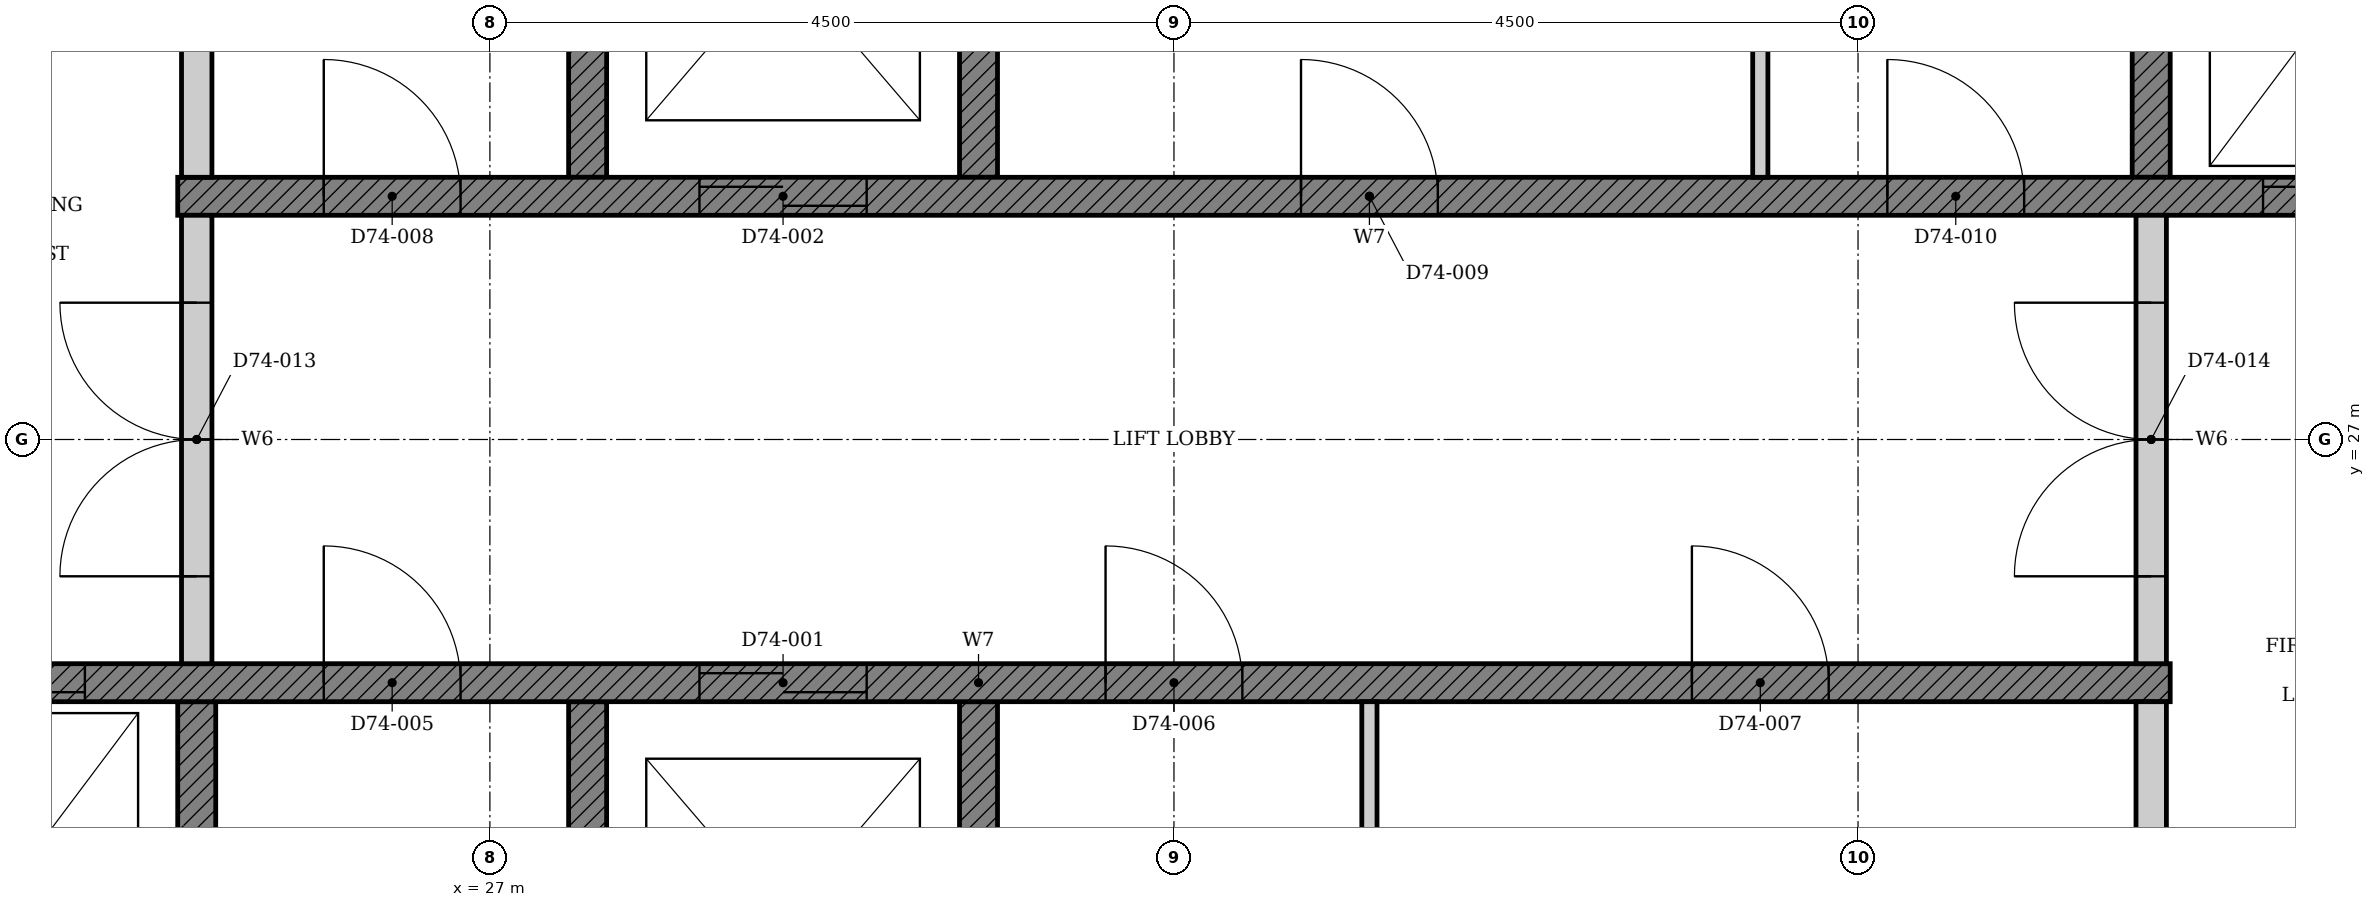
"""IFC4 building model, lengths in metres.
Left out: names, types, materials, properties, quantities, classifications, styles, units other than length and angle.
Written with IfcOpenShell. Run it as: python <this file> out.ifc"""

import sys

from ifc_helpers import new_model, si_unit, direction, frame, frame_2d, origin, place, context, subcontext, project, spatial, polyline, rectangle, outline, extrude, element, fill, save


model = new_model("IFC4")
c1 = context("Model", 3, precision=1e-05, world=origin(), true_north=direction((0.0, 1.0)))
c2 = subcontext(c1, "Body", "Model", "MODEL_VIEW")
j1 = project(units=[si_unit("LENGTHUNIT", "METRE"), si_unit("PLANEANGLEUNIT", "RADIAN")], contexts=[c1])
p1 = place(None, origin())
s1 = spatial("IfcSite", under=j1, at=p1, CompositionType="ELEMENT")
p2 = place(p1, origin())
s2 = spatial("IfcBuilding", under=s1, at=p2, CompositionType="ELEMENT")
p3 = place(p2, frame((0.0, 0.0, 290.8)))
s3 = spatial("IfcBuildingStorey", under=s2, at=p3, CompositionType="ELEMENT", Elevation=290.8)
p4 = place(p3, origin())
e1 = element("IfcWall", 1, at=p4, inside=s3, PredefinedType="SHEAR", context=c2, shape_type="SweptSolid", body=[
    extrude(outline(polyline([(22.375, 22.35), (25.197, 22.35), (25.197, 25.275), (24.947, 25.275), (24.947, 22.65), (22.625, 22.65), (22.625, 25.275), (22.375, 25.275), (22.375, 22.35)])), origin(), (0.0, 0.0, 1.0), 3.4),
])
p5 = place(p3, origin())
e2 = element("IfcWall", 2, at=p5, inside=s3, PredefinedType="SHEAR", context=c2, shape_type="SweptSolid", body=[
    extrude(outline(polyline([(27.518, 22.35), (30.339, 22.35), (30.339, 25.275), (30.089, 25.275), (30.089, 22.65), (27.768, 22.65), (27.768, 25.275), (27.518, 25.275), (27.518, 22.35)])), origin(), (0.0, 0.0, 1.0), 3.4),
])
p6 = place(p3, origin())
e3 = element("IfcWall", 3, at=p6, inside=s3, PredefinedType="SHEAR", context=c2, shape_type="SweptSolid", body=[
    extrude(outline(polyline([(27.518, 28.725), (27.768, 28.725), (27.768, 31.35), (30.089, 31.35), (30.089, 28.725), (30.339, 28.725), (30.339, 31.65), (27.518, 31.65), (27.518, 28.725)])), origin(), (0.0, 0.0, 1.0), 3.4),
])
p7 = place(p3, origin())
e4 = element("IfcWall", 4, at=p7, inside=s3, PredefinedType="SHEAR", context=c2, shape_type="SweptSolid", body=[
    extrude(outline(polyline([(37.803, 28.725), (38.053, 28.725), (38.053, 31.35), (40.375, 31.35), (40.375, 28.725), (40.625, 28.725), (40.625, 31.65), (37.803, 31.65), (37.803, 28.725)])), origin(), (0.0, 0.0, 1.0), 3.4),
])
p8 = place(p3, frame((22.375, 25.4, 0.0), z_axis=(0.0, 0.0, 1.0), x_axis=(1.0, 0.0, 0.0)))
e5 = element("IfcWall", 5, at=p8, inside=s3, PredefinedType="SHEAR", context=c2, shape_type="SweptSolid", body=[
    extrude(rectangle(XDim=15.678, YDim=0.25, at=frame_2d((7.839, 0.0))), origin(), (0.0, 0.0, 1.0), 3.4),
])
p9 = place(p8, frame((6.004, 0.0, 0.0)))
e6 = element("IfcOpeningElement", 6, at=p9, cuts=e5, PredefinedType="OPENING", context=c2, shape_type="SweptSolid", body=[
    extrude(rectangle(XDim=1.1, YDim=2.1, at=frame_2d((0.55, 1.05))), frame((0.0, 0.135, 0.0), z_axis=(0.0, -1.0, 0.0), x_axis=(1.0, 0.0, 0.0)), (0.0, 0.0, 1.0), 0.27),
])
p10 = place(p8, frame((0.861, 0.0, 0.0)))
e7 = element("IfcOpeningElement", 7, at=p10, cuts=e5, PredefinedType="OPENING", context=c2, shape_type="SweptSolid", body=[
    extrude(rectangle(XDim=1.1, YDim=2.1, at=frame_2d((0.55, 1.05))), frame((0.0, 0.135, 0.0), z_axis=(0.0, -1.0, 0.0), x_axis=(1.0, 0.0, 0.0)), (0.0, 0.0, 1.0), 0.27),
])
p11 = place(p8, frame((3.532, 0.0, 0.0)))
e8 = element("IfcOpeningElement", 8, at=p11, cuts=e5, PredefinedType="OPENING", context=c2, shape_type="SweptSolid", body=[
    extrude(rectangle(XDim=0.9, YDim=2.1, at=frame_2d((0.45, 1.05))), frame((0.0, 0.135, 0.0), z_axis=(0.0, -1.0, 0.0), x_axis=(1.0, 0.0, 0.0)), (0.0, 0.0, 1.0), 0.27),
])
p12 = place(p8, frame((8.675, 0.0, 0.0)))
e9 = element("IfcOpeningElement", 9, at=p12, cuts=e5, PredefinedType="OPENING", context=c2, shape_type="SweptSolid", body=[
    extrude(rectangle(XDim=0.9, YDim=2.1, at=frame_2d((0.45, 1.05))), frame((0.0, 0.135, 0.0), z_axis=(0.0, -1.0, 0.0), x_axis=(1.0, 0.0, 0.0)), (0.0, 0.0, 1.0), 0.27),
])
p13 = place(p8, frame((12.532, 0.0, 0.0)))
e10 = element("IfcOpeningElement", 10, at=p13, cuts=e5, PredefinedType="OPENING", context=c2, shape_type="SweptSolid", body=[
    extrude(rectangle(XDim=0.9, YDim=2.1, at=frame_2d((0.45, 1.05))), frame((0.0, 0.135, 0.0), z_axis=(0.0, -1.0, 0.0), x_axis=(1.0, 0.0, 0.0)), (0.0, 0.0, 1.0), 0.27),
])
p14 = place(p3, frame((24.947, 28.6, 0.0), z_axis=(0.0, 0.0, 1.0), x_axis=(1.0, 0.0, 0.0)))
e11 = element("IfcWall", 11, at=p14, inside=s3, PredefinedType="SHEAR", context=c2, shape_type="SweptSolid", body=[
    extrude(rectangle(XDim=15.678, YDim=0.25, at=frame_2d((7.839, 0.0))), origin(), (0.0, 0.0, 1.0), 3.4),
])
p15 = place(p14, frame((3.432, 0.0, 0.0)))
e12 = element("IfcOpeningElement", 12, at=p15, cuts=e11, PredefinedType="OPENING", context=c2, shape_type="SweptSolid", body=[
    extrude(rectangle(XDim=1.1, YDim=2.1, at=frame_2d((0.55, 1.05))), frame((0.0, 0.135, 0.0), z_axis=(0.0, -1.0, 0.0), x_axis=(1.0, 0.0, 0.0)), (0.0, 0.0, 1.0), 0.27),
])
p16 = place(p14, frame((13.718, 0.0, 0.0)))
e13 = element("IfcOpeningElement", 13, at=p16, cuts=e11, PredefinedType="OPENING", context=c2, shape_type="SweptSolid", body=[
    extrude(rectangle(XDim=1.1, YDim=2.1, at=frame_2d((0.55, 1.05))), frame((0.0, 0.135, 0.0), z_axis=(0.0, -1.0, 0.0), x_axis=(1.0, 0.0, 0.0)), (0.0, 0.0, 1.0), 0.27),
])
p17 = place(p14, frame((0.961, 0.0, 0.0)))
e14 = element("IfcOpeningElement", 14, at=p17, cuts=e11, PredefinedType="OPENING", context=c2, shape_type="SweptSolid", body=[
    extrude(rectangle(XDim=0.9, YDim=2.1, at=frame_2d((0.45, 1.05))), frame((0.0, 0.135, 0.0), z_axis=(0.0, -1.0, 0.0), x_axis=(1.0, 0.0, 0.0)), (0.0, 0.0, 1.0), 0.27),
])
p18 = place(p14, frame((7.389, 0.0, 0.0)))
e15 = element("IfcOpeningElement", 15, at=p18, cuts=e11, PredefinedType="OPENING", context=c2, shape_type="SweptSolid", body=[
    extrude(rectangle(XDim=0.9, YDim=2.1, at=frame_2d((0.45, 1.05))), frame((0.0, 0.135, 0.0), z_axis=(0.0, -1.0, 0.0), x_axis=(1.0, 0.0, 0.0)), (0.0, 0.0, 1.0), 0.27),
])
p19 = place(p14, frame((11.246, 0.0, 0.0)))
e16 = element("IfcOpeningElement", 16, at=p19, cuts=e11, PredefinedType="OPENING", context=c2, shape_type="SweptSolid", body=[
    extrude(rectangle(XDim=0.9, YDim=2.1, at=frame_2d((0.45, 1.05))), frame((0.0, 0.135, 0.0), z_axis=(0.0, -1.0, 0.0), x_axis=(1.0, 0.0, 0.0)), (0.0, 0.0, 1.0), 0.27),
])
p20 = place(p3, frame((37.928, 22.65, 0.0), z_axis=(0.0, 0.0, 1.0), x_axis=(0.0, 1.0, 0.0)))
e17 = element("IfcWall", 17, at=p20, inside=s3, PredefinedType="PARTITIONING", context=c2, shape_type="SweptSolid", body=[
    extrude(rectangle(XDim=2.625, YDim=0.2, at=frame_2d((1.312, 0.0))), origin(), (0.0, 0.0, 1.0), 3.4),
])
p21 = place(p3, frame((32.786, 22.65, 0.0), z_axis=(0.0, 0.0, 1.0), x_axis=(0.0, 1.0, 0.0)))
e18 = element("IfcWall", 18, at=p21, inside=s3, PredefinedType="PARTITIONING", context=c2, shape_type="SweptSolid", body=[
    extrude(rectangle(XDim=2.625, YDim=0.1, at=frame_2d((1.312, 0.0))), origin(), (0.0, 0.0, 1.0), 3.4),
])
p22 = place(p3, frame((25.072, 28.725, 0.0), z_axis=(0.0, 0.0, 1.0), x_axis=(0.0, 1.0, 0.0)))
e19 = element("IfcWall", 19, at=p22, inside=s3, PredefinedType="PARTITIONING", context=c2, shape_type="SweptSolid", body=[
    extrude(rectangle(XDim=2.625, YDim=0.2, at=frame_2d((1.312, 0.0))), origin(), (0.0, 0.0, 1.0), 3.4),
])
p23 = place(p3, frame((35.357, 28.725, 0.0), z_axis=(0.0, 0.0, 1.0), x_axis=(0.0, 1.0, 0.0)))
e20 = element("IfcWall", 20, at=p23, inside=s3, PredefinedType="PARTITIONING", context=c2, shape_type="SweptSolid", body=[
    extrude(rectangle(XDim=2.625, YDim=0.1, at=frame_2d((1.312, 0.0))), origin(), (0.0, 0.0, 1.0), 3.4),
])
p24 = place(p3, frame((25.072, 25.525, 0.0), z_axis=(0.0, 0.0, 1.0), x_axis=(0.0, 1.0, 0.0)))
e21 = element("IfcWall", 21, at=p24, inside=s3, PredefinedType="PARTITIONING", context=c2, shape_type="SweptSolid", body=[
    extrude(rectangle(XDim=2.95, YDim=0.2, at=frame_2d((1.475, 0.0))), origin(), (0.0, 0.0, 1.0), 3.4),
])
p25 = place(p24, frame((0.575, 0.0, 0.0)))
e22 = element("IfcOpeningElement", 22, at=p25, cuts=e21, PredefinedType="OPENING", context=c2, shape_type="SweptSolid", body=[
    extrude(rectangle(XDim=1.8, YDim=2.1, at=frame_2d((0.9, 1.05))), frame((0.0, 0.11, 0.0), z_axis=(0.0, -1.0, 0.0), x_axis=(1.0, 0.0, 0.0)), (0.0, 0.0, 1.0), 0.22),
])
p26 = place(p3, frame((37.928, 25.525, 0.0), z_axis=(0.0, 0.0, 1.0), x_axis=(0.0, 1.0, 0.0)))
e23 = element("IfcWall", 23, at=p26, inside=s3, PredefinedType="PARTITIONING", context=c2, shape_type="SweptSolid", body=[
    extrude(rectangle(XDim=2.95, YDim=0.2, at=frame_2d((1.475, 0.0))), origin(), (0.0, 0.0, 1.0), 3.4),
])
p27 = place(p26, frame((0.575, 0.0, 0.0)))
e24 = element("IfcOpeningElement", 24, at=p27, cuts=e23, PredefinedType="OPENING", context=c2, shape_type="SweptSolid", body=[
    extrude(rectangle(XDim=1.8, YDim=2.1, at=frame_2d((0.9, 1.05))), frame((0.0, 0.11, 0.0), z_axis=(0.0, -1.0, 0.0), x_axis=(1.0, 0.0, 0.0)), (0.0, 0.0, 1.0), 0.22),
])
p28 = place(p9, origin())
e25 = element("IfcDoor", 25, at=p28, inside=s3, OperationType="DOUBLE_DOOR_SLIDING", PredefinedType="DOOR", context=c2, shape_type="SweptSolid", body=[
    extrude(rectangle(XDim=1.1, YDim=2.1, at=frame_2d((0.55, 1.05))), frame((0.0, 0.025, 0.0), z_axis=(0.0, -1.0, 0.0), x_axis=(1.0, 0.0, 0.0)), (0.0, 0.0, 1.0), 0.05),
])
fill(e6, e25)
p29 = place(p15, origin())
e26 = element("IfcDoor", 26, at=p29, inside=s3, OperationType="DOUBLE_DOOR_SLIDING", PredefinedType="DOOR", context=c2, shape_type="SweptSolid", body=[
    extrude(rectangle(XDim=1.1, YDim=2.1, at=frame_2d((0.55, 1.05))), frame((0.0, 0.025, 0.0), z_axis=(0.0, -1.0, 0.0), x_axis=(1.0, 0.0, 0.0)), (0.0, 0.0, 1.0), 0.05),
])
fill(e12, e26)
p30 = place(p10, origin())
e27 = element("IfcDoor", 27, at=p30, inside=s3, OperationType="DOUBLE_DOOR_SLIDING", PredefinedType="DOOR", context=c2, shape_type="SweptSolid", body=[
    extrude(rectangle(XDim=1.1, YDim=2.1, at=frame_2d((0.55, 1.05))), frame((0.0, 0.025, 0.0), z_axis=(0.0, -1.0, 0.0), x_axis=(1.0, 0.0, 0.0)), (0.0, 0.0, 1.0), 0.05),
])
fill(e7, e27)
p31 = place(p16, origin())
e28 = element("IfcDoor", 28, at=p31, inside=s3, OperationType="DOUBLE_DOOR_SLIDING", PredefinedType="DOOR", context=c2, shape_type="SweptSolid", body=[
    extrude(rectangle(XDim=1.1, YDim=2.1, at=frame_2d((0.55, 1.05))), frame((0.0, 0.025, 0.0), z_axis=(0.0, -1.0, 0.0), x_axis=(1.0, 0.0, 0.0)), (0.0, 0.0, 1.0), 0.05),
])
fill(e13, e28)
p32 = place(p11, origin())
e29 = element("IfcDoor", 29, at=p32, inside=s3, OperationType="SINGLE_SWING_LEFT", PredefinedType="DOOR", context=c2, shape_type="SweptSolid", body=[
    extrude(rectangle(XDim=0.9, YDim=2.1, at=frame_2d((0.45, 1.05))), frame((0.0, 0.025, 0.0), z_axis=(0.0, -1.0, 0.0), x_axis=(1.0, 0.0, 0.0)), (0.0, 0.0, 1.0), 0.05),
])
fill(e8, e29)
p33 = place(p12, origin())
e30 = element("IfcDoor", 30, at=p33, inside=s3, OperationType="SINGLE_SWING_LEFT", PredefinedType="DOOR", context=c2, shape_type="SweptSolid", body=[
    extrude(rectangle(XDim=0.9, YDim=2.1, at=frame_2d((0.45, 1.05))), frame((0.0, 0.025, 0.0), z_axis=(0.0, -1.0, 0.0), x_axis=(1.0, 0.0, 0.0)), (0.0, 0.0, 1.0), 0.05),
])
fill(e9, e30)
p34 = place(p13, origin())
e31 = element("IfcDoor", 31, at=p34, inside=s3, OperationType="SINGLE_SWING_LEFT", PredefinedType="DOOR", context=c2, shape_type="SweptSolid", body=[
    extrude(rectangle(XDim=0.9, YDim=2.1, at=frame_2d((0.45, 1.05))), frame((0.0, 0.025, 0.0), z_axis=(0.0, -1.0, 0.0), x_axis=(1.0, 0.0, 0.0)), (0.0, 0.0, 1.0), 0.05),
])
fill(e10, e31)
p35 = place(p17, origin())
e32 = element("IfcDoor", 32, at=p35, inside=s3, OperationType="SINGLE_SWING_LEFT", PredefinedType="DOOR", context=c2, shape_type="SweptSolid", body=[
    extrude(rectangle(XDim=0.9, YDim=2.1, at=frame_2d((0.45, 1.05))), frame((0.0, 0.025, 0.0), z_axis=(0.0, -1.0, 0.0), x_axis=(1.0, 0.0, 0.0)), (0.0, 0.0, 1.0), 0.05),
])
fill(e14, e32)
p36 = place(p18, origin())
e33 = element("IfcDoor", 33, at=p36, inside=s3, OperationType="SINGLE_SWING_LEFT", PredefinedType="DOOR", context=c2, shape_type="SweptSolid", body=[
    extrude(rectangle(XDim=0.9, YDim=2.1, at=frame_2d((0.45, 1.05))), frame((0.0, 0.025, 0.0), z_axis=(0.0, -1.0, 0.0), x_axis=(1.0, 0.0, 0.0)), (0.0, 0.0, 1.0), 0.05),
])
fill(e15, e33)
p37 = place(p19, origin())
e34 = element("IfcDoor", 34, at=p37, inside=s3, OperationType="SINGLE_SWING_LEFT", PredefinedType="DOOR", context=c2, shape_type="SweptSolid", body=[
    extrude(rectangle(XDim=0.9, YDim=2.1, at=frame_2d((0.45, 1.05))), frame((0.0, 0.025, 0.0), z_axis=(0.0, -1.0, 0.0), x_axis=(1.0, 0.0, 0.0)), (0.0, 0.0, 1.0), 0.05),
])
fill(e16, e34)
p38 = place(p25, origin())
e35 = element("IfcDoor", 35, at=p38, inside=s3, OperationType="DOUBLE_DOOR_SINGLE_SWING", PredefinedType="DOOR", context=c2, shape_type="SweptSolid", body=[
    extrude(rectangle(XDim=1.8, YDim=2.1, at=frame_2d((0.9, 1.05))), frame((0.0, 0.025, 0.0), z_axis=(0.0, -1.0, 0.0), x_axis=(1.0, 0.0, 0.0)), (0.0, 0.0, 1.0), 0.05),
])
fill(e22, e35)
p39 = place(p27, origin())
e36 = element("IfcDoor", 36, at=p39, inside=s3, OperationType="DOUBLE_DOOR_SINGLE_SWING", PredefinedType="DOOR", context=c2, shape_type="SweptSolid", body=[
    extrude(rectangle(XDim=1.8, YDim=2.1, at=frame_2d((0.9, 1.05))), frame((0.0, 0.025, 0.0), z_axis=(0.0, -1.0, 0.0), x_axis=(1.0, 0.0, 0.0)), (0.0, 0.0, 1.0), 0.05),
])
fill(e24, e36)
save(model, sys.argv[1])
